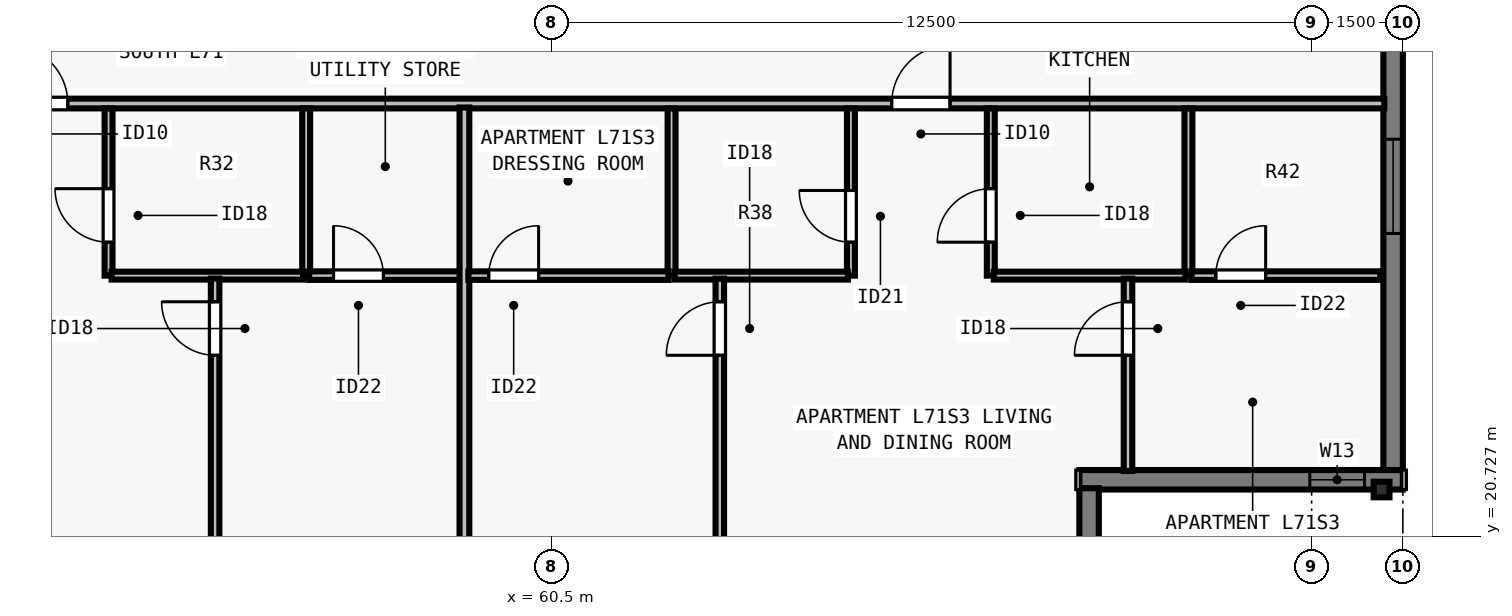
"""IFC4 building model, lengths in metres.
Left out: names, types, materials, properties, quantities, classifications, styles, units other than length and angle.
Written with IfcOpenShell. Run it as: python <this file> out.ifc"""

import sys

from ifc_helpers import new_model, si_unit, direction, frame, frame_2d, origin, origin_2d, place, context, subcontext, project, spatial, rectangle, i_section, extrude, element, fill, save


model = new_model("IFC4")
c1 = context("Model", 3, precision=1e-05, world=origin(), true_north=direction((0.0, 1.0)))
c2 = subcontext(c1, "Body", "Model", "MODEL_VIEW")
j1 = project(units=[si_unit("LENGTHUNIT", "METRE"), si_unit("PLANEANGLEUNIT", "RADIAN")], contexts=[c1])
p1 = place(None, origin())
s1 = spatial("IfcSite", under=j1, at=p1, CompositionType="ELEMENT")
p2 = place(p1, origin())
s2 = spatial("IfcBuilding", under=s1, at=p2, CompositionType="ELEMENT")
p3 = place(p2, frame((0.0, 0.0, 258.5)))
s3 = spatial("IfcBuildingStorey", under=s2, at=p3, CompositionType="ELEMENT", Elevation=258.5)
p4 = place(p3, frame((74.15, 21.5, 0.0), z_axis=(0.0, 0.0, 1.0), x_axis=(0.0, 1.0, 0.0)))
e1 = element("IfcColumn", 1, at=p4, inside=s3, PredefinedType="COLUMN", context=c2, shape_type="SweptSolid", body=[
    extrude(i_section(OverallWidth=0.256, OverallDepth=0.26, WebThickness=0.01, FlangeThickness=0.017, FilletRadius=0.013, at=origin_2d()), origin(), (0.0, 0.0, 1.0), 3.5),
])
p5 = place(p3, frame((74.34, 56.5, 0.0), z_axis=(0.0, 0.0, 1.0), x_axis=(0.0, -1.0, 0.0)))
e2 = element("IfcWall", 2, at=p5, inside=s3, PredefinedType="SOLIDWALL", context=c2, shape_type="SweptSolid", body=[
    extrude(rectangle(XDim=34.702, YDim=0.32, at=frame_2d((17.351, 0.0))), origin(), (0.0, 0.0, 1.0), 3.29),
])
p6 = place(p5, frame((6.888, 0.0, 0.8)))
e3 = element("IfcOpeningElement", 3, at=p6, cuts=e2, PredefinedType="OPENING", context=c2, shape_type="SweptSolid", body=[
    extrude(rectangle(XDim=1.55, YDim=1.678, at=frame_2d((0.775, 0.839))), frame((0.0, 0.17, 0.0), z_axis=(0.0, -1.0, 0.0), x_axis=(1.0, 0.0, 0.0)), (0.0, 0.0, 1.0), 0.34),
])
p7 = place(p5, frame((10.113, 0.0, 0.8)))
e4 = element("IfcOpeningElement", 4, at=p7, cuts=e2, PredefinedType="OPENING", context=c2, shape_type="SweptSolid", body=[
    extrude(rectangle(XDim=1.85, YDim=1.678, at=frame_2d((0.925, 0.839))), frame((0.0, 0.17, 0.0), z_axis=(0.0, -1.0, 0.0), x_axis=(1.0, 0.0, 0.0)), (0.0, 0.0, 1.0), 0.34),
])
p8 = place(p5, frame((14.888, 0.0, 0.8)))
e5 = element("IfcOpeningElement", 5, at=p8, cuts=e2, PredefinedType="OPENING", context=c2, shape_type="SweptSolid", body=[
    extrude(rectangle(XDim=1.55, YDim=1.678, at=frame_2d((0.775, 0.839))), frame((0.0, 0.17, 0.0), z_axis=(0.0, -1.0, 0.0), x_axis=(1.0, 0.0, 0.0)), (0.0, 0.0, 1.0), 0.34),
])
p9 = place(p5, frame((18.114, 0.0, 0.8)))
e6 = element("IfcOpeningElement", 6, at=p9, cuts=e2, PredefinedType="OPENING", context=c2, shape_type="SweptSolid", body=[
    extrude(rectangle(XDim=1.85, YDim=1.678, at=frame_2d((0.925, 0.839))), frame((0.0, 0.17, 0.0), z_axis=(0.0, -1.0, 0.0), x_axis=(1.0, 0.0, 0.0)), (0.0, 0.0, 1.0), 0.34),
])
p10 = place(p5, frame((23.614, 0.0, 0.8)))
e7 = element("IfcOpeningElement", 7, at=p10, cuts=e2, PredefinedType="OPENING", context=c2, shape_type="SweptSolid", body=[
    extrude(rectangle(XDim=1.85, YDim=1.678, at=frame_2d((0.925, 0.839))), frame((0.0, 0.17, 0.0), z_axis=(0.0, -1.0, 0.0), x_axis=(1.0, 0.0, 0.0)), (0.0, 0.0, 1.0), 0.34),
])
p11 = place(p5, frame((29.24, 0.0, 0.8)))
e8 = element("IfcOpeningElement", 8, at=p11, cuts=e2, PredefinedType="OPENING", context=c2, shape_type="SweptSolid", body=[
    extrude(rectangle(XDim=1.55, YDim=1.678, at=frame_2d((0.775, 0.839))), frame((0.0, 0.17, 0.0), z_axis=(0.0, -1.0, 0.0), x_axis=(1.0, 0.0, 0.0)), (0.0, 0.0, 1.0), 0.34),
])
p12 = place(p3, frame((74.5, 21.66, 0.0), z_axis=(0.0, 0.0, 1.0), x_axis=(-1.0, 0.0, 0.0)))
e9 = element("IfcWall", 9, at=p12, inside=s3, PredefinedType="SOLIDWALL", context=c2, shape_type="SweptSolid", body=[
    extrude(rectangle(XDim=5.32, YDim=0.32, at=frame_2d((2.66, 0.0))), origin(), (0.0, 0.0, 1.0), 3.29),
])
p13 = place(p12, frame((0.63, 0.0, 0.8)))
e10 = element("IfcOpeningElement", 10, at=p13, cuts=e9, PredefinedType="OPENING", context=c2, shape_type="SweptSolid", body=[
    extrude(rectangle(XDim=0.9, YDim=1.678, at=frame_2d((0.45, 0.839))), frame((0.0, 0.17, 0.0), z_axis=(0.0, -1.0, 0.0), x_axis=(1.0, 0.0, 0.0)), (0.0, 0.0, 1.0), 0.34),
])
p14 = place(p3, frame((69.34, 21.522, 0.0), z_axis=(0.0, 0.0, 1.0), x_axis=(0.0, -1.0, 0.0)))
e11 = element("IfcWall", 11, at=p14, inside=s3, PredefinedType="SOLIDWALL", context=c2, shape_type="SweptSolid", body=[
    extrude(rectangle(XDim=4.724, YDim=0.32, at=frame_2d((2.362, 0.0))), origin(), (0.0, 0.0, 1.0), 3.29),
])
p15 = place(p3, frame((29.805, 27.847, 0.0), z_axis=(0.0, 0.0, 1.0), x_axis=(1.0, 0.0, 0.0)))
e12 = element("IfcWall", 12, at=p15, inside=s3, PredefinedType="PARTITIONING", context=c2, shape_type="SweptSolid", body=[
    extrude(rectangle(XDim=44.39, YDim=0.16, at=frame_2d((22.195, 0.0))), origin(), (0.0, 0.0, 1.0), 2.958),
])
p16 = place(p15, frame((7.206, 0.0, 0.0)))
e13 = element("IfcOpeningElement", 13, at=p16, cuts=e12, PredefinedType="OPENING", context=c2, shape_type="SweptSolid", body=[
    extrude(rectangle(XDim=0.96, YDim=2.18, at=frame_2d((0.48, 1.09))), frame((0.0, 0.09, 0.0), z_axis=(0.0, -1.0, 0.0), x_axis=(1.0, 0.0, 0.0)), (0.0, 0.0, 1.0), 0.18),
])
p17 = place(p15, frame((21.78, 0.0, 0.0)))
e14 = element("IfcOpeningElement", 14, at=p17, cuts=e12, PredefinedType="OPENING", context=c2, shape_type="SweptSolid", body=[
    extrude(rectangle(XDim=0.96, YDim=2.18, at=frame_2d((0.48, 1.09))), frame((0.0, 0.09, 0.0), z_axis=(0.0, -1.0, 0.0), x_axis=(1.0, 0.0, 0.0)), (0.0, 0.0, 1.0), 0.18),
])
p18 = place(p15, frame((36.289, 0.0, 0.0)))
e15 = element("IfcOpeningElement", 15, at=p18, cuts=e12, PredefinedType="OPENING", context=c2, shape_type="SweptSolid", body=[
    extrude(rectangle(XDim=0.96, YDim=2.18, at=frame_2d((0.48, 1.09))), frame((0.0, 0.09, 0.0), z_axis=(0.0, -1.0, 0.0), x_axis=(1.0, 0.0, 0.0)), (0.0, 0.0, 1.0), 0.18),
])
p19 = place(p3, frame((56.465, 25.018, 0.0), z_axis=(0.0, 0.0, 1.0), x_axis=(0.0, 1.0, 0.0)))
e16 = element("IfcWall", 16, at=p19, inside=s3, PredefinedType="PLUMBINGWALL", context=c2, shape_type="SweptSolid", body=[
    extrude(rectangle(XDim=2.75, YDim=0.13, at=frame_2d((1.375, 0.0))), origin(), (0.0, 0.0, 1.0), 3.29),
])
p20 = place(p3, frame((53.215, 25.018, 0.0), z_axis=(0.0, 0.0, 1.0), x_axis=(0.0, 1.0, 0.0)))
e17 = element("IfcWall", 17, at=p20, inside=s3, PredefinedType="PLUMBINGWALL", context=c2, shape_type="SweptSolid", body=[
    extrude(rectangle(XDim=2.75, YDim=0.13, at=frame_2d((1.375, 0.0))), origin(), (0.0, 0.0, 1.0), 2.958),
])
p21 = place(p20, frame((0.55, 0.0, 0.0)))
e18 = element("IfcOpeningElement", 18, at=p21, cuts=e17, PredefinedType="OPENING", context=c2, shape_type="SweptSolid", body=[
    extrude(rectangle(XDim=0.88, YDim=2.1, at=frame_2d((0.44, 1.05))), frame((0.0, 0.075, 0.0), z_axis=(0.0, -1.0, 0.0), x_axis=(1.0, 0.0, 0.0)), (0.0, 0.0, 1.0), 0.15),
])
p22 = place(p3, frame((53.265, 25.018, 0.0), z_axis=(0.0, 0.0, 1.0), x_axis=(1.0, 0.0, 0.0)))
e19 = element("IfcWall", 19, at=p22, inside=s3, PredefinedType="PLUMBINGWALL", context=c2, shape_type="SweptSolid", body=[
    extrude(rectangle(XDim=3.15, YDim=0.13, at=frame_2d((1.575, 0.0))), origin(), (0.0, 0.0, 1.0), 3.29),
])
p23 = place(p3, frame((54.968, 16.88, 0.0), z_axis=(0.0, 0.0, 1.0), x_axis=(0.0, 1.0, 0.0)))
e20 = element("IfcWall", 20, at=p23, inside=s3, PredefinedType="PARTITIONING", context=c2, shape_type="SweptSolid", body=[
    extrude(rectangle(XDim=8.088, YDim=0.14, at=frame_2d((4.044, 0.0))), origin(), (0.0, 0.0, 1.0), 3.29),
])
p24 = place(p23, frame((6.827, 0.0, 0.0)))
e21 = element("IfcOpeningElement", 21, at=p24, cuts=e20, PredefinedType="OPENING", context=c2, shape_type="SweptSolid", body=[
    extrude(rectangle(XDim=0.88, YDim=2.1, at=frame_2d((0.44, 1.05))), frame((0.0, 0.08, 0.0), z_axis=(0.0, -1.0, 0.0), x_axis=(1.0, 0.0, 0.0)), (0.0, 0.0, 1.0), 0.16),
])
p25 = place(p3, frame((56.515, 25.018, 0.0), z_axis=(0.0, 0.0, 1.0), x_axis=(1.0, 0.0, 0.0)))
e22 = element("IfcWall", 22, at=p25, inside=s3, PredefinedType="PARTITIONING", context=c2, shape_type="SweptSolid", body=[
    extrude(rectangle(XDim=2.603, YDim=0.14, at=frame_2d((1.301, 0.0))), origin(), (0.0, 0.0, 1.0), 3.29),
])
p26 = place(p25, frame((0.4, 0.0, 0.0)))
e23 = element("IfcOpeningElement", 23, at=p26, cuts=e22, PredefinedType="OPENING", context=c2, shape_type="SweptSolid", body=[
    extrude(rectangle(XDim=0.82, YDim=2.1, at=frame_2d((0.41, 1.05))), frame((0.0, 0.08, 0.0), z_axis=(0.0, -1.0, 0.0), x_axis=(1.0, 0.0, 0.0)), (0.0, 0.0, 1.0), 0.16),
])
p27 = place(p3, frame((59.067, 16.805, 0.0), z_axis=(0.0, 0.0, 1.0), x_axis=(0.0, 1.0, 0.0)))
e24 = element("IfcWall", 24, at=p27, inside=s3, PredefinedType="PARTITIONING", context=c2, shape_type="SweptSolid", body=[
    extrude(rectangle(XDim=10.978, YDim=0.16, at=frame_2d((5.489, 0.0))), origin(), (0.0, 0.0, 1.0), 3.29),
])
p28 = place(p3, frame((62.474, 25.018, 0.0), z_axis=(0.0, 0.0, 1.0), x_axis=(0.0, 1.0, 0.0)))
e25 = element("IfcWall", 25, at=p28, inside=s3, PredefinedType="PLUMBINGWALL", context=c2, shape_type="SweptSolid", body=[
    extrude(rectangle(XDim=2.75, YDim=0.13, at=frame_2d((1.375, 0.0))), origin(), (0.0, 0.0, 1.0), 2.573),
])
p29 = place(p3, frame((65.424, 25.018, 0.0), z_axis=(0.0, 0.0, 1.0), x_axis=(0.0, 1.0, 0.0)))
e26 = element("IfcWall", 26, at=p29, inside=s3, PredefinedType="PLUMBINGWALL", context=c2, shape_type="SweptSolid", body=[
    extrude(rectangle(XDim=2.75, YDim=0.13, at=frame_2d((1.375, 0.0))), origin(), (0.0, 0.0, 1.0), 3.29),
])
p30 = place(p29, frame((0.55, 0.0, 0.0)))
e27 = element("IfcOpeningElement", 27, at=p30, cuts=e26, PredefinedType="OPENING", context=c2, shape_type="SweptSolid", body=[
    extrude(rectangle(XDim=0.85, YDim=2.08, at=frame_2d((0.425, 1.04))), frame((0.0, 0.075, 0.0), z_axis=(0.0, -1.0, 0.0), x_axis=(1.0, 0.0, 0.0)), (0.0, 0.0, 1.0), 0.15),
])
p31 = place(p3, frame((62.524, 25.018, 0.0), z_axis=(0.0, 0.0, 1.0), x_axis=(1.0, 0.0, 0.0)))
e28 = element("IfcWall", 28, at=p31, inside=s3, PredefinedType="PLUMBINGWALL", context=c2, shape_type="SweptSolid", body=[
    extrude(rectangle(XDim=2.85, YDim=0.13, at=frame_2d((1.425, 0.0))), origin(), (0.0, 0.0, 1.0), 3.29),
])
p32 = place(p3, frame((70.974, 25.018, 0.0), z_axis=(0.0, 0.0, 1.0), x_axis=(0.0, 1.0, 0.0)))
e29 = element("IfcWall", 29, at=p32, inside=s3, PredefinedType="PLUMBINGWALL", context=c2, shape_type="SweptSolid", body=[
    extrude(rectangle(XDim=2.75, YDim=0.13, at=frame_2d((1.375, 0.0))), origin(), (0.0, 0.0, 1.0), 3.29),
])
p33 = place(p3, frame((67.724, 25.018, 0.0), z_axis=(0.0, 0.0, 1.0), x_axis=(0.0, 1.0, 0.0)))
e30 = element("IfcWall", 30, at=p33, inside=s3, PredefinedType="PLUMBINGWALL", context=c2, shape_type="SweptSolid", body=[
    extrude(rectangle(XDim=2.75, YDim=0.13, at=frame_2d((1.375, 0.0))), origin(), (0.0, 0.0, 1.0), 3.29),
])
p34 = place(p33, frame((0.55, 0.0, 0.0)))
e31 = element("IfcOpeningElement", 31, at=p34, cuts=e30, PredefinedType="OPENING", context=c2, shape_type="SweptSolid", body=[
    extrude(rectangle(XDim=0.88, YDim=2.1, at=frame_2d((0.44, 1.05))), frame((0.0, 0.075, 0.0), z_axis=(0.0, -1.0, 0.0), x_axis=(1.0, 0.0, 0.0)), (0.0, 0.0, 1.0), 0.15),
])
p35 = place(p3, frame((67.774, 25.018, 0.0), z_axis=(0.0, 0.0, 1.0), x_axis=(1.0, 0.0, 0.0)))
e32 = element("IfcWall", 32, at=p35, inside=s3, PredefinedType="PLUMBINGWALL", context=c2, shape_type="SweptSolid", body=[
    extrude(rectangle(XDim=3.15, YDim=0.13, at=frame_2d((1.575, 0.0))), origin(), (0.0, 0.0, 1.0), 2.958),
])
p36 = place(p3, frame((63.268, 16.88, 0.0), z_axis=(0.0, 0.0, 1.0), x_axis=(0.0, 1.0, 0.0)))
e33 = element("IfcWall", 33, at=p36, inside=s3, PredefinedType="PARTITIONING", context=c2, shape_type="SweptSolid", body=[
    extrude(rectangle(XDim=8.088, YDim=0.14, at=frame_2d((4.044, 0.0))), origin(), (0.0, 0.0, 1.0), 3.29),
])
p37 = place(p36, frame((6.827, 0.0, 0.0)))
e34 = element("IfcOpeningElement", 34, at=p37, cuts=e33, PredefinedType="OPENING", context=c2, shape_type="SweptSolid", body=[
    extrude(rectangle(XDim=0.88, YDim=2.1, at=frame_2d((0.44, 1.05))), frame((0.0, 0.08, 0.0), z_axis=(0.0, -1.0, 0.0), x_axis=(1.0, 0.0, 0.0)), (0.0, 0.0, 1.0), 0.16),
])
p38 = place(p3, frame((59.133, 25.018, 0.0), z_axis=(0.0, 0.0, 1.0), x_axis=(1.0, 0.0, 0.0)))
e35 = element("IfcWall", 35, at=p38, inside=s3, PredefinedType="PARTITIONING", context=c2, shape_type="SweptSolid", body=[
    extrude(rectangle(XDim=3.291, YDim=0.14, at=frame_2d((1.646, 0.0))), origin(), (0.0, 0.0, 1.0), 3.29),
])
p39 = place(p38, frame((0.335, 0.0, 0.0)))
e36 = element("IfcOpeningElement", 36, at=p39, cuts=e35, PredefinedType="OPENING", context=c2, shape_type="SweptSolid", body=[
    extrude(rectangle(XDim=0.82, YDim=2.1, at=frame_2d((0.41, 1.05))), frame((0.0, 0.08, 0.0), z_axis=(0.0, -1.0, 0.0), x_axis=(1.0, 0.0, 0.0)), (0.0, 0.0, 1.0), 0.16),
])
p40 = place(p3, frame((69.98, 21.805, 0.0), z_axis=(0.0, 0.0, 1.0), x_axis=(0.0, 1.0, 0.0)))
e37 = element("IfcWall", 37, at=p40, inside=s3, PredefinedType="PARTITIONING", context=c2, shape_type="SweptSolid", body=[
    extrude(rectangle(XDim=3.163, YDim=0.14, at=frame_2d((1.581, 0.0))), origin(), (0.0, 0.0, 1.0), 3.29),
])
p41 = place(p40, frame((1.903, 0.0, 0.0)))
e38 = element("IfcOpeningElement", 38, at=p41, cuts=e37, PredefinedType="OPENING", context=c2, shape_type="SweptSolid", body=[
    extrude(rectangle(XDim=0.88, YDim=2.1, at=frame_2d((0.44, 1.05))), frame((0.0, 0.08, 0.0), z_axis=(0.0, -1.0, 0.0), x_axis=(1.0, 0.0, 0.0)), (0.0, 0.0, 1.0), 0.16),
])
p42 = place(p3, frame((71.024, 25.018, 0.0), z_axis=(0.0, 0.0, 1.0), x_axis=(1.0, 0.0, 0.0)))
e39 = element("IfcWall", 39, at=p42, inside=s3, PredefinedType="PARTITIONING", context=c2, shape_type="SweptSolid", body=[
    extrude(rectangle(XDim=3.106, YDim=0.14, at=frame_2d((1.553, 0.0))), origin(), (0.0, 0.0, 1.0), 3.29),
])
p43 = place(p42, frame((0.4, 0.0, 0.0)))
e40 = element("IfcOpeningElement", 40, at=p43, cuts=e39, PredefinedType="OPENING", context=c2, shape_type="SweptSolid", body=[
    extrude(rectangle(XDim=0.82, YDim=2.1, at=frame_2d((0.41, 1.05))), frame((0.0, 0.08, 0.0), z_axis=(0.0, -1.0, 0.0), x_axis=(1.0, 0.0, 0.0)), (0.0, 0.0, 1.0), 0.16),
])
p44 = place(p11, origin())
e41 = element("IfcWindow", 41, at=p44, inside=s3, PartitioningType="SINGLE_PANEL", PredefinedType="WINDOW", context=c2, shape_type="SweptSolid", body=[
    extrude(rectangle(XDim=1.55, YDim=1.678, at=frame_2d((0.775, 0.839))), frame((0.0, -0.05, 0.0), z_axis=(0.0, -1.0, 0.0), x_axis=(1.0, 0.0, 0.0)), (0.0, 0.0, 1.0), 0.06),
])
fill(e8, e41)
p45 = place(p13, origin())
e42 = element("IfcWindow", 42, at=p45, inside=s3, PartitioningType="SINGLE_PANEL", PredefinedType="WINDOW", context=c2, shape_type="SweptSolid", body=[
    extrude(rectangle(XDim=0.9, YDim=1.678, at=frame_2d((0.45, 0.839))), frame((0.0, -0.04, 0.0), z_axis=(0.0, -1.0, 0.0), x_axis=(1.0, 0.0, 0.0)), (0.0, 0.0, 1.0), 0.06),
])
fill(e10, e42)
p46 = place(p21, origin())
e43 = element("IfcDoor", 43, at=p46, inside=s3, OperationType="SINGLE_SWING_RIGHT", PredefinedType="DOOR", context=c2, shape_type="SweptSolid", body=[
    extrude(rectangle(XDim=0.88, YDim=2.1, at=frame_2d((0.44, 1.05))), frame((0.0, 0.025, 0.0), z_axis=(0.0, -1.0, 0.0), x_axis=(1.0, 0.0, 0.0)), (0.0, 0.0, 1.0), 0.05),
])
fill(e18, e43)
p47 = place(p26, origin())
e44 = element("IfcDoor", 44, at=p47, inside=s3, OperationType="SINGLE_SWING_LEFT", PredefinedType="DOOR", context=c2, shape_type="SweptSolid", body=[
    extrude(rectangle(XDim=0.82, YDim=2.1, at=frame_2d((0.41, 1.05))), frame((0.0, 0.025, 0.0), z_axis=(0.0, -1.0, 0.0), x_axis=(1.0, 0.0, 0.0)), (0.0, 0.0, 1.0), 0.05),
])
fill(e23, e44)
p48 = place(p24, origin())
e45 = element("IfcDoor", 45, at=p48, inside=s3, OperationType="SINGLE_SWING_RIGHT", PredefinedType="DOOR", context=c2, shape_type="SweptSolid", body=[
    extrude(rectangle(XDim=0.88, YDim=2.1, at=frame_2d((0.44, 1.05))), frame((0.0, 0.025, 0.0), z_axis=(0.0, -1.0, 0.0), x_axis=(1.0, 0.0, 0.0)), (0.0, 0.0, 1.0), 0.05),
])
fill(e21, e45)
p49 = place(p17, origin())
e46 = element("IfcDoor", 46, at=p49, inside=s3, OperationType="SINGLE_SWING_LEFT", PredefinedType="DOOR", context=c2, shape_type="SweptSolid", body=[
    extrude(rectangle(XDim=0.96, YDim=2.18, at=frame_2d((0.48, 1.09))), frame((0.0, 0.025, 0.0), z_axis=(0.0, -1.0, 0.0), x_axis=(1.0, 0.0, 0.0)), (0.0, 0.0, 1.0), 0.05),
])
fill(e14, e46)
p50 = place(p30, origin())
e47 = element("IfcDoor", 47, at=p50, inside=s3, OperationType="SINGLE_SWING_RIGHT", PredefinedType="DOOR", context=c2, shape_type="SweptSolid", body=[
    extrude(rectangle(XDim=0.85, YDim=2.08, at=frame_2d((0.425, 1.04))), frame((0.0, 0.025, 0.0), z_axis=(0.0, -1.0, 0.0), x_axis=(1.0, 0.0, 0.0)), (0.0, 0.0, 1.0), 0.05),
])
fill(e27, e47)
p51 = place(p34, origin())
e48 = element("IfcDoor", 48, at=p51, inside=s3, OperationType="SINGLE_SWING_LEFT", PredefinedType="DOOR", context=c2, shape_type="SweptSolid", body=[
    extrude(rectangle(XDim=0.88, YDim=2.1, at=frame_2d((0.44, 1.05))), frame((0.0, 0.025, 0.0), z_axis=(0.0, -1.0, 0.0), x_axis=(1.0, 0.0, 0.0)), (0.0, 0.0, 1.0), 0.05),
])
fill(e31, e48)
p52 = place(p39, origin())
e49 = element("IfcDoor", 49, at=p52, inside=s3, OperationType="SINGLE_SWING_RIGHT", PredefinedType="DOOR", context=c2, shape_type="SweptSolid", body=[
    extrude(rectangle(XDim=0.82, YDim=2.1, at=frame_2d((0.41, 1.05))), frame((0.0, 0.025, 0.0), z_axis=(0.0, -1.0, 0.0), x_axis=(1.0, 0.0, 0.0)), (0.0, 0.0, 1.0), 0.05),
])
fill(e36, e49)
p53 = place(p37, origin())
e50 = element("IfcDoor", 50, at=p53, inside=s3, OperationType="SINGLE_SWING_LEFT", PredefinedType="DOOR", context=c2, shape_type="SweptSolid", body=[
    extrude(rectangle(XDim=0.88, YDim=2.1, at=frame_2d((0.44, 1.05))), frame((0.0, 0.025, 0.0), z_axis=(0.0, -1.0, 0.0), x_axis=(1.0, 0.0, 0.0)), (0.0, 0.0, 1.0), 0.05),
])
fill(e34, e50)
p54 = place(p43, origin())
e51 = element("IfcDoor", 51, at=p54, inside=s3, OperationType="SINGLE_SWING_RIGHT", PredefinedType="DOOR", context=c2, shape_type="SweptSolid", body=[
    extrude(rectangle(XDim=0.82, YDim=2.1, at=frame_2d((0.41, 1.05))), frame((0.0, 0.025, 0.0), z_axis=(0.0, -1.0, 0.0), x_axis=(1.0, 0.0, 0.0)), (0.0, 0.0, 1.0), 0.05),
])
fill(e40, e51)
p55 = place(p41, origin())
e52 = element("IfcDoor", 52, at=p55, inside=s3, OperationType="SINGLE_SWING_LEFT", PredefinedType="DOOR", context=c2, shape_type="SweptSolid", body=[
    extrude(rectangle(XDim=0.88, YDim=2.1, at=frame_2d((0.44, 1.05))), frame((0.0, 0.025, 0.0), z_axis=(0.0, -1.0, 0.0), x_axis=(1.0, 0.0, 0.0)), (0.0, 0.0, 1.0), 0.05),
])
fill(e38, e52)
p56 = place(p18, origin())
e53 = element("IfcDoor", 53, at=p56, inside=s3, OperationType="SINGLE_SWING_RIGHT", PredefinedType="DOOR", context=c2, shape_type="SweptSolid", body=[
    extrude(rectangle(XDim=0.96, YDim=2.18, at=frame_2d((0.48, 1.09))), frame((0.0, 0.025, 0.0), z_axis=(0.0, -1.0, 0.0), x_axis=(1.0, 0.0, 0.0)), (0.0, 0.0, 1.0), 0.05),
])
fill(e15, e53)
save(model, sys.argv[1])
